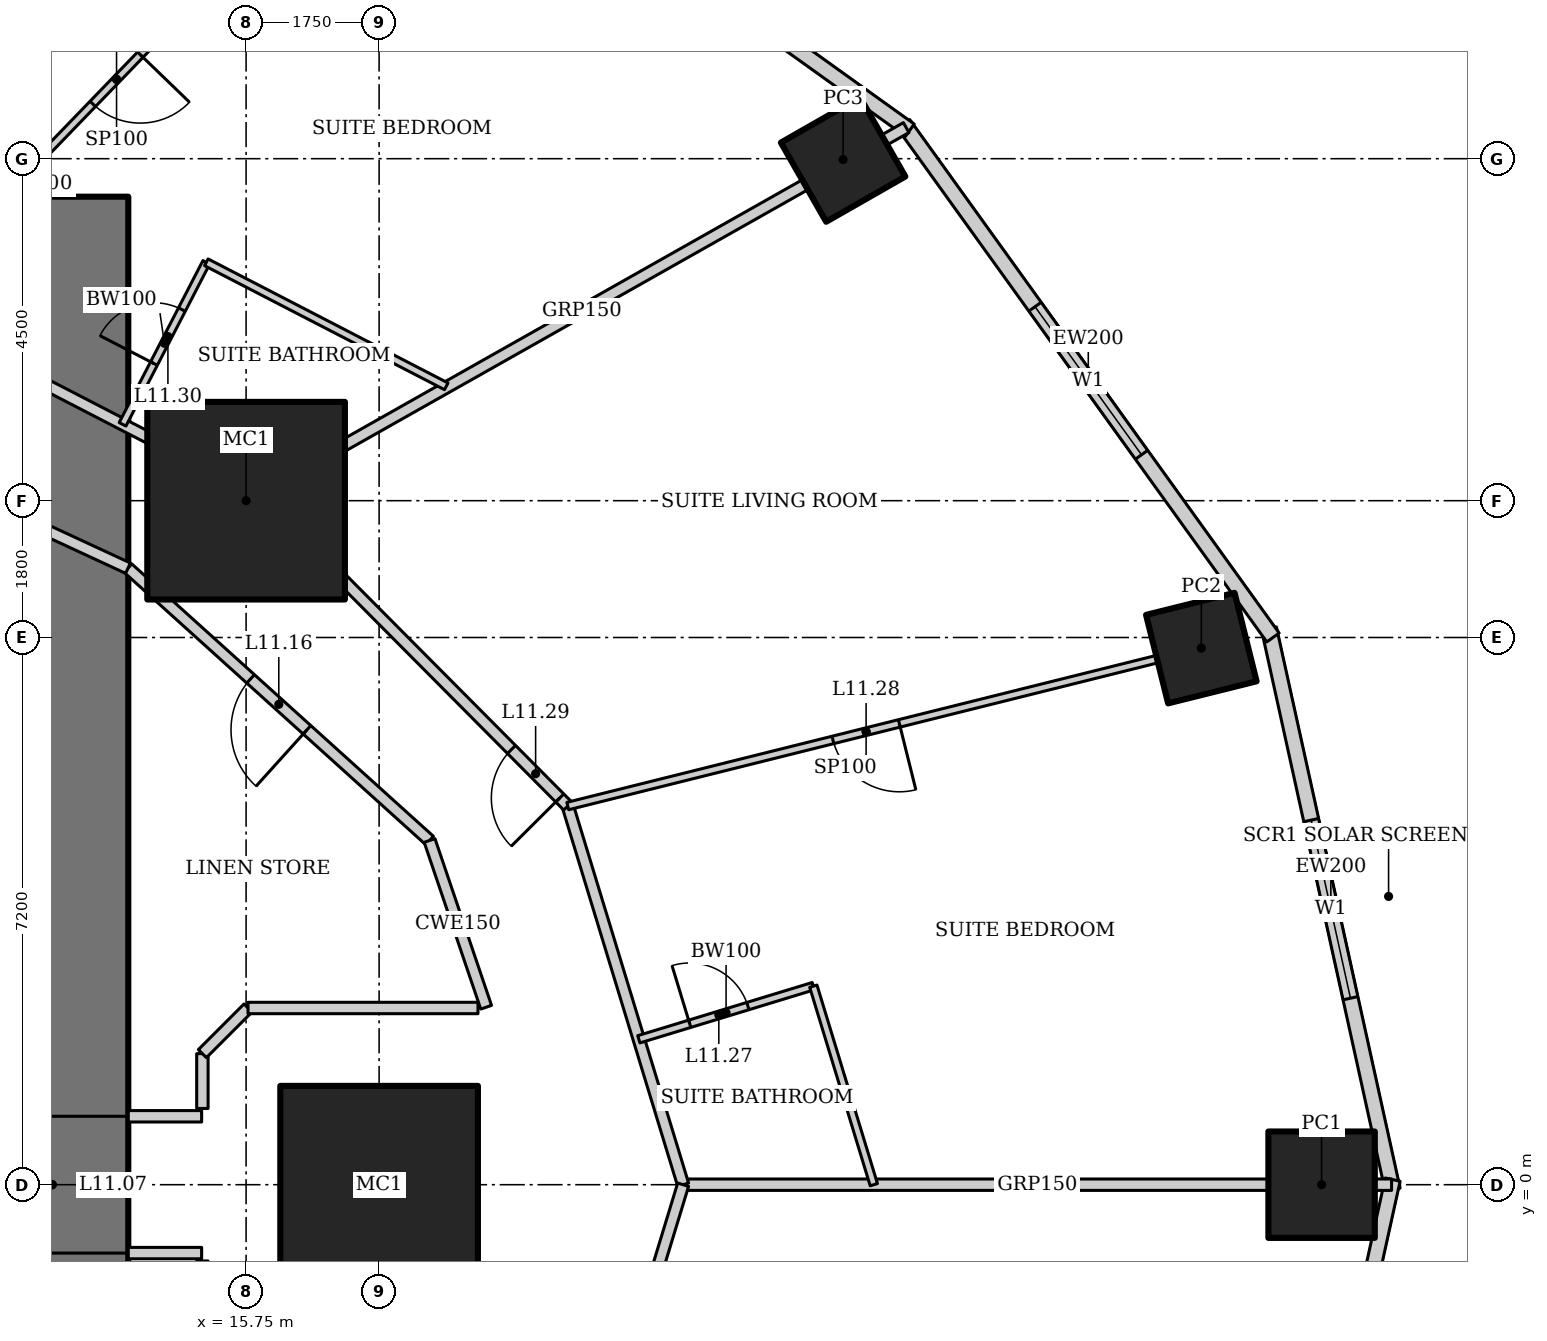
"""IFC4 building model, lengths in metres.
Left out: names, types, materials, properties, quantities, classifications, styles, units other than length and angle.
Written with IfcOpenShell. Run it as: python <this file> out.ifc"""

import sys

from ifc_helpers import new_model, si_unit, direction, frame, frame_2d, origin, origin_2d, place, context, subcontext, project, spatial, rectangle, hollow_rectangle, extrude, element, fill, save


model = new_model("IFC4")
c1 = context("Model", 3, precision=1e-05, world=origin(), true_north=direction((0.0, 1.0)))
c2 = subcontext(c1, "Body", "Model", "MODEL_VIEW")
j1 = project(units=[si_unit("LENGTHUNIT", "METRE"), si_unit("PLANEANGLEUNIT", "RADIAN")], contexts=[c1])
p1 = place(None, origin())
s1 = spatial("IfcSite", under=j1, at=p1, CompositionType="ELEMENT")
p2 = place(p1, origin())
s2 = spatial("IfcBuilding", under=s1, at=p2, CompositionType="ELEMENT")
p3 = place(p2, frame((0.0, 0.0, 55.0)))
s3 = spatial("IfcBuildingStorey", under=s2, at=p3, CompositionType="ELEMENT", Elevation=55.0)
for number, where, z_axis, x_axis in (
    (1, (17.5, 0.0, 0.0), (0.0, 0.0, 1.0), (1.0, 0.0, 0.0)),
    (2, (15.75, 9.0, 0.0), (0.0, 0.0, 1.0), (1.0, 0.0, 0.0)),
):
    element("IfcColumn", number, at=place(p3, frame(where, z_axis=z_axis, x_axis=x_axis)), inside=s3, PredefinedType="COLUMN", context=c2, shape_type="SweptSolid", body=[
        extrude(hollow_rectangle(XDim=2.6, YDim=2.6, WallThickness=0.13, at=origin_2d()), origin(), (0.0, 0.0, 1.0), 3.6),
    ])
p4 = place(p3, frame((29.9, 0.0, 0.0), z_axis=(0.0, 0.0, 1.0), x_axis=(1.0, 0.0, 0.0)))
e3 = element("IfcColumn", 3, at=p4, inside=s3, PredefinedType="COLUMN", context=c2, shape_type="SweptSolid", body=[
    extrude(hollow_rectangle(XDim=1.4, YDim=1.4, WallThickness=0.1, at=origin_2d()), origin(), (0.0, 0.0, 1.0), 3.6),
])
p5 = place(p3, frame((28.318, 7.06, 0.0), z_axis=(0.0, 0.0, 1.0), x_axis=(0.970295726276, 0.2419218956, 0.0)))
e4 = element("IfcColumn", 4, at=p5, inside=s3, PredefinedType="COLUMN", context=c2, shape_type="SweptSolid", body=[
    extrude(hollow_rectangle(XDim=1.2, YDim=1.2, WallThickness=0.1, at=origin_2d()), origin(), (0.0, 0.0, 1.0), 3.6),
])
p6 = place(p3, frame((23.605, 13.489, 0.0), z_axis=(0.0, 0.0, 1.0), x_axis=(0.86824298017, 0.496139221777, 0.0)))
e5 = element("IfcColumn", 5, at=p6, inside=s3, PredefinedType="COLUMN", context=c2, shape_type="SweptSolid", body=[
    extrude(hollow_rectangle(XDim=1.2, YDim=1.2, WallThickness=0.12, at=origin_2d()), origin(), (0.0, 0.0, 1.0), 3.6),
])
p7 = place(p3, frame((13.2, -13.0, 0.0), z_axis=(0.0, 0.0, 1.0), x_axis=(0.0, 1.0, 0.0)))
e6 = element("IfcWall", 6, at=p7, inside=s3, PredefinedType="SHEAR", context=c2, shape_type="SweptSolid", body=[
    extrude(rectangle(XDim=26.0, YDim=2.0, at=frame_2d((13.0, 0.0))), origin(), (0.0, 0.0, 1.0), 3.6),
])
p8 = place(p7, frame((12.1, 0.0, 0.0)))
e7 = element("IfcOpeningElement", 7, at=p8, cuts=e6, PredefinedType="OPENING", context=c2, shape_type="SweptSolid", body=[
    extrude(rectangle(XDim=1.8, YDim=2.1, at=frame_2d((0.9, 1.05))), frame((0.0, 1.01, 0.0), z_axis=(0.0, -1.0, 0.0), x_axis=(1.0, 0.0, 0.0)), (0.0, 0.0, 1.0), 2.02),
])
p9 = place(p3, frame((30.835, -0.067, 0.0), z_axis=(0.0, 0.0, 1.0), x_axis=(-0.215238065514, 0.976561608478, 0.0)))
e8 = element("IfcWall", 8, at=p9, inside=s3, PredefinedType="SOLIDWALL", context=c2, shape_type="SweptSolid", body=[
    extrude(rectangle(XDim=7.562, YDim=0.2, at=frame_2d((3.781, 0.0))), origin(), (0.0, 0.0, 1.0), 3.45),
])
p10 = place(p9, frame((2.581, 0.0, 0.5)))
e9 = element("IfcOpeningElement", 9, at=p10, cuts=e8, PredefinedType="OPENING", context=c2, shape_type="SweptSolid", body=[
    extrude(rectangle(XDim=2.4, YDim=2.2, at=frame_2d((1.2, 1.1))), frame((0.0, 0.11, 0.0), z_axis=(0.0, -1.0, 0.0), x_axis=(1.0, 0.0, 0.0)), (0.0, 0.0, 1.0), 0.22),
])
p11 = place(p3, frame((29.26, 7.2, 0.0), z_axis=(0.0, 0.0, 1.0), x_axis=(-0.583937613703, 0.811798536155, 0.0)))
e10 = element("IfcWall", 10, at=p11, inside=s3, PredefinedType="SOLIDWALL", context=c2, shape_type="SweptSolid", body=[
    extrude(rectangle(XDim=8.323, YDim=0.2, at=frame_2d((4.162, 0.0))), origin(), (0.0, 0.0, 1.0), 3.45),
])
p12 = place(p11, frame((2.961, 0.0, 0.5)))
e11 = element("IfcOpeningElement", 11, at=p12, cuts=e10, PredefinedType="OPENING", context=c2, shape_type="SweptSolid", body=[
    extrude(rectangle(XDim=2.4, YDim=2.2, at=frame_2d((1.2, 1.1))), frame((0.0, 0.11, 0.0), z_axis=(0.0, -1.0, 0.0), x_axis=(1.0, 0.0, 0.0)), (0.0, 0.0, 1.0), 0.22),
])
p13 = place(p3, frame((24.482, 13.875, 0.0), z_axis=(0.0, 0.0, 1.0), x_axis=(-0.812791321576, 0.582554948112, 0.0)))
e12 = element("IfcWall", 12, at=p13, inside=s3, PredefinedType="SOLIDWALL", context=c2, shape_type="SweptSolid", body=[
    extrude(rectangle(XDim=8.063, YDim=0.2, at=frame_2d((4.032, 0.0))), origin(), (0.0, 0.0, 1.0), 3.45),
])
p14 = place(p13, frame((2.832, 0.0, 0.5)))
e13 = element("IfcOpeningElement", 13, at=p14, cuts=e12, PredefinedType="OPENING", context=c2, shape_type="SweptSolid", body=[
    extrude(rectangle(XDim=2.4, YDim=2.2, at=frame_2d((1.2, 1.1))), frame((0.0, 0.11, 0.0), z_axis=(0.0, -1.0, 0.0), x_axis=(1.0, 0.0, 0.0)), (0.0, 0.0, 1.0), 0.22),
])
p15 = place(p3, frame((29.208, -7.318, 0.0), z_axis=(0.0, 0.0, 1.0), x_axis=(0.215238065514, 0.976561608478, 0.0)))
e14 = element("IfcWall", 14, at=p15, inside=s3, PredefinedType="SOLIDWALL", context=c2, shape_type="SweptSolid", body=[
    extrude(rectangle(XDim=7.562, YDim=0.2, at=frame_2d((3.781, 0.0))), origin(), (0.0, 0.0, 1.0), 3.45),
])
p16 = place(p15, frame((2.581, 0.0, 0.5)))
e15 = element("IfcOpeningElement", 15, at=p16, cuts=e14, PredefinedType="OPENING", context=c2, shape_type="SweptSolid", body=[
    extrude(rectangle(XDim=2.4, YDim=2.2, at=frame_2d((1.2, 1.1))), frame((0.0, 0.11, 0.0), z_axis=(0.0, -1.0, 0.0), x_axis=(1.0, 0.0, 0.0)), (0.0, 0.0, 1.0), 0.22),
])
p17 = place(p3, frame((30.821, 0.0, 0.0), z_axis=(0.0, 0.0, 1.0), x_axis=(-1.0, 0.0, 0.0)))
e16 = element("IfcWall", 16, at=p17, inside=s3, PredefinedType="PARTITIONING", context=c2, shape_type="SweptSolid", body=[
    extrude(rectangle(XDim=9.321, YDim=0.15, at=frame_2d((4.66, 0.0))), origin(), (0.0, 0.0, 1.0), 2.528),
])
p18 = place(p3, frame((24.435, 13.909, 0.0), z_axis=(0.0, 0.0, 1.0), x_axis=(-0.870612006791, -0.491970256856, 0.0)))
e17 = element("IfcWall", 17, at=p18, inside=s3, PredefinedType="PARTITIONING", context=c2, shape_type="SweptSolid", body=[
    extrude(rectangle(XDim=9.802, YDim=0.15, at=frame_2d((4.901, 0.0))), origin(), (0.0, 0.0, 1.0), 2.693),
])
p19 = place(p3, frame((21.5, 0.0, 0.0), z_axis=(0.0, 0.0, 1.0), x_axis=(-0.291383581394, 0.95660629754, 0.0)))
e18 = element("IfcWall", 18, at=p19, inside=s3, PredefinedType="PARTITIONING", context=c2, shape_type="SweptSolid", body=[
    extrude(rectangle(XDim=5.208, YDim=0.15, at=frame_2d((2.604, 0.0))), origin(), (0.0, 0.0, 1.0), 3.45),
])
p20 = place(p3, frame((19.982, 4.982, 0.0), z_axis=(0.0, 0.0, 1.0), x_axis=(-0.705121546414, 0.709086457904, 0.0)))
e19 = element("IfcWall", 19, at=p20, inside=s3, PredefinedType="PARTITIONING", context=c2, shape_type="SweptSolid", body=[
    extrude(rectangle(XDim=5.788, YDim=0.15, at=frame_2d((2.894, 0.0))), origin(), (0.0, 0.0, 1.0), 3.45),
])
p21 = place(p20, frame((0.15, 0.0, 0.0)))
e20 = element("IfcOpeningElement", 20, at=p21, cuts=e19, PredefinedType="OPENING", context=c2, shape_type="SweptSolid", body=[
    extrude(rectangle(XDim=0.9, YDim=2.1, at=frame_2d((0.45, 1.05))), frame((0.0, 0.085, 0.0), z_axis=(0.0, -1.0, 0.0), x_axis=(1.0, 0.0, 0.0)), (0.0, 0.0, 1.0), 0.17),
])
p22 = place(p3, frame((15.901, 9.086, 0.0), z_axis=(0.0, 0.0, 1.0), x_axis=(-0.888333171507, 0.459199495209, 0.0)))
e21 = element("IfcWall", 21, at=p22, inside=s3, PredefinedType="PARTITIONING", context=c2, shape_type="SweptSolid", body=[
    extrude(rectangle(XDim=5.351, YDim=0.15, at=frame_2d((2.676, 0.0))), origin(), (0.0, 0.0, 1.0), 3.45),
])
p23 = place(p3, frame((19.982, -4.982, 0.0), z_axis=(0.0, 0.0, 1.0), x_axis=(0.291383581394, 0.95660629754, 0.0)))
e22 = element("IfcWall", 22, at=p23, inside=s3, PredefinedType="PARTITIONING", context=c2, shape_type="SweptSolid", body=[
    extrude(rectangle(XDim=5.208, YDim=0.15, at=frame_2d((2.604, 0.0))), origin(), (0.0, 0.0, 1.0), 3.45),
])
p24 = place(p23, frame((0.15, 0.0, 0.0)))
e23 = element("IfcOpeningElement", 23, at=p24, cuts=e22, PredefinedType="OPENING", context=c2, shape_type="SweptSolid", body=[
    extrude(rectangle(XDim=0.9, YDim=2.1, at=frame_2d((0.45, 1.05))), frame((0.0, 0.085, 0.0), z_axis=(0.0, -1.0, 0.0), x_axis=(1.0, 0.0, 0.0)), (0.0, 0.0, 1.0), 0.17),
])
p25 = place(p3, frame((18.164, 4.529, 0.0), z_axis=(0.0, 0.0, 1.0), x_axis=(-0.742194222, 0.670184852731, 0.0)))
e24 = element("IfcWall", 24, at=p25, inside=s3, PredefinedType="PARTITIONING", context=c2, shape_type="SweptSolid", body=[
    extrude(rectangle(XDim=5.347, YDim=0.15, at=frame_2d((2.673, 0.0))), origin(), (0.0, 0.0, 1.0), 3.45),
])
p26 = place(p25, frame((2.173, 0.0, 0.0)))
e25 = element("IfcOpeningElement", 25, at=p26, cuts=e24, PredefinedType="OPENING", context=c2, shape_type="SweptSolid", body=[
    extrude(rectangle(XDim=1.0, YDim=2.1, at=frame_2d((0.5, 1.05))), frame((0.0, 0.085, 0.0), z_axis=(0.0, -1.0, 0.0), x_axis=(1.0, 0.0, 0.0)), (0.0, 0.0, 1.0), 0.17),
])
p27 = place(p3, frame((14.196, 8.112, 0.0), z_axis=(0.0, 0.0, 1.0), x_axis=(-0.907279653965, 0.420527798727, 0.0)))
e26 = element("IfcWall", 26, at=p27, inside=s3, PredefinedType="PARTITIONING", context=c2, shape_type="SweptSolid", body=[
    extrude(rectangle(XDim=4.844, YDim=0.15, at=frame_2d((2.422, 0.0))), origin(), (0.0, 0.0, 1.0), 3.45),
])
p28 = place(p3, frame((20.917, 1.913, 0.0), z_axis=(0.0, 0.0, 1.0), x_axis=(0.956591303063, 0.291432803411, 0.0)))
e27 = element("IfcWall", 27, at=p28, inside=s3, PredefinedType="PARTITIONING", context=c2, shape_type="SweptSolid", body=[
    extrude(rectangle(XDim=2.4, YDim=0.1, at=frame_2d((1.2, 0.0))), origin(), (0.0, 0.0, 1.0), 3.45),
])
p29 = place(p28, frame((0.7, 0.0, 0.0)))
e28 = element("IfcOpeningElement", 28, at=p29, cuts=e27, PredefinedType="OPENING", context=c2, shape_type="SweptSolid", body=[
    extrude(rectangle(XDim=0.8, YDim=2.1, at=frame_2d((0.4, 1.05))), frame((0.0, 0.06, 0.0), z_axis=(0.0, -1.0, 0.0), x_axis=(1.0, 0.0, 0.0)), (0.0, 0.0, 1.0), 0.12),
])
p30 = place(p3, frame((23.213, 2.613, 0.0), z_axis=(0.0, 0.0, 1.0), x_axis=(0.291339473488, -0.956619731757, 0.0)))
e29 = element("IfcWall", 29, at=p30, inside=s3, PredefinedType="PARTITIONING", context=c2, shape_type="SweptSolid", body=[
    extrude(rectangle(XDim=2.731, YDim=0.1, at=frame_2d((1.365, 0.0))), origin(), (0.0, 0.0, 1.0), 3.45),
])
p31 = place(p3, frame((27.833, 6.939, 0.0), z_axis=(0.0, 0.0, 1.0), x_axis=(-0.97029673161, -0.24191786339, 0.0)))
e30 = element("IfcWall", 30, at=p31, inside=s3, PredefinedType="PARTITIONING", context=c2, shape_type="SweptSolid", body=[
    extrude(rectangle(XDim=8.091, YDim=0.1, at=frame_2d((4.045, 0.0))), origin(), (0.0, 0.0, 1.0), 2.333),
])
p32 = place(p31, frame((3.595, 0.0, 0.0)))
e31 = element("IfcOpeningElement", 31, at=p32, cuts=e30, PredefinedType="OPENING", context=c2, shape_type="SweptSolid", body=[
    extrude(rectangle(XDim=0.9, YDim=2.1, at=frame_2d((0.45, 1.05))), frame((0.0, 0.06, 0.0), z_axis=(0.0, -1.0, 0.0), x_axis=(1.0, 0.0, 0.0)), (0.0, 0.0, 1.0), 0.12),
])
p33 = place(p3, frame((14.125, 10.005, 0.0), z_axis=(0.0, 0.0, 1.0), x_axis=(0.459218106657, 0.888323550582, 0.0)))
e32 = element("IfcWall", 32, at=p33, inside=s3, PredefinedType="PARTITIONING", context=c2, shape_type="SweptSolid", body=[
    extrude(rectangle(XDim=2.4, YDim=0.1, at=frame_2d((1.2, 0.0))), origin(), (0.0, 0.0, 1.0), 3.45),
])
p34 = place(p33, frame((0.9, 0.0, 0.0)))
e33 = element("IfcOpeningElement", 33, at=p34, cuts=e32, PredefinedType="OPENING", context=c2, shape_type="SweptSolid", body=[
    extrude(rectangle(XDim=0.8, YDim=2.1, at=frame_2d((0.4, 1.05))), frame((0.0, 0.06, 0.0), z_axis=(0.0, -1.0, 0.0), x_axis=(1.0, 0.0, 0.0)), (0.0, 0.0, 1.0), 0.12),
])
p35 = place(p3, frame((15.227, 12.137, 0.0), z_axis=(0.0, 0.0, 1.0), x_axis=(0.888342312029, -0.459181812204, 0.0)))
e34 = element("IfcWall", 34, at=p35, inside=s3, PredefinedType="PARTITIONING", context=c2, shape_type="SweptSolid", body=[
    extrude(rectangle(XDim=3.554, YDim=0.1, at=frame_2d((1.777, 0.0))), origin(), (0.0, 0.0, 1.0), 3.45),
])
p36 = place(p3, frame((16.944, 17.545, 0.0), z_axis=(0.0, 0.0, 1.0), x_axis=(-0.694680670522, -0.71931826475, 0.0)))
e35 = element("IfcWall", 35, at=p36, inside=s3, PredefinedType="PARTITIONING", context=c2, shape_type="SweptSolid", body=[
    extrude(rectangle(XDim=8.344, YDim=0.1, at=frame_2d((4.172, 0.0))), origin(), (0.0, 0.0, 1.0), 2.528),
])
p37 = place(p36, frame((3.722, 0.0, 0.0)))
e36 = element("IfcOpeningElement", 36, at=p37, cuts=e35, PredefinedType="OPENING", context=c2, shape_type="SweptSolid", body=[
    extrude(rectangle(XDim=0.9, YDim=2.1, at=frame_2d((0.45, 1.05))), frame((0.0, 0.06, 0.0), z_axis=(0.0, -1.0, 0.0), x_axis=(1.0, 0.0, 0.0)), (0.0, 0.0, 1.0), 0.12),
])
p38 = place(p3, frame((13.2, 13.0, 0.0), z_axis=(0.0, 0.0, 1.0), x_axis=(-0.719347134512, 0.69465077562, 0.0)))
e37 = element("IfcWall", 37, at=p38, inside=s3, PredefinedType="PARTITIONING", context=c2, shape_type="SweptSolid", body=[
    extrude(rectangle(XDim=0.465, YDim=0.1, at=frame_2d((0.232, 0.0))), origin(), (0.0, 0.0, 1.0), 3.45),
])
p39 = place(p3, frame((18.908, 2.335, 0.0), z_axis=(0.0, 0.0, 1.0), x_axis=(-0.321124194945, 0.947037090837, 0.0)))
e38 = element("IfcWall", 38, at=p39, inside=s3, PredefinedType="PARTITIONING", context=c2, shape_type="SweptSolid", body=[
    extrude(rectangle(XDim=2.317, YDim=0.15, at=frame_2d((1.158, 0.0))), origin(), (0.0, 0.0, 1.0), 3.45),
])
for number, where, z_axis, x_axis in (
    (39, (14.2, -0.9, 0.0), (0.0, 0.0, 1.0), (1.0, 0.0, 0.0)),
    (40, (14.2, 0.9, 0.0), (0.0, 0.0, 1.0), (1.0, 0.0, 0.0)),
):
    element("IfcWall", number, at=place(p3, frame(where, z_axis=z_axis, x_axis=x_axis)), inside=s3, PredefinedType="PARTITIONING", context=c2, shape_type="SweptSolid", body=[
        extrude(rectangle(XDim=0.965, YDim=0.15, at=frame_2d((0.482, 0.0))), origin(), (0.0, 0.0, 1.0), 3.45),
    ])
p40 = place(p3, frame((15.175, 1.003, 0.0), z_axis=(0.0, 0.0, 1.0), x_axis=(0.0, 1.0, 0.0)))
e41 = element("IfcWall", 41, at=p40, inside=s3, PredefinedType="PARTITIONING", context=c2, shape_type="SweptSolid", body=[
    extrude(rectangle(XDim=0.721, YDim=0.15, at=frame_2d((0.361, 0.0))), origin(), (0.0, 0.0, 1.0), 3.45),
])
p41 = place(p3, frame((15.175, 1.725, 0.0), z_axis=(0.0, 0.0, 1.0), x_axis=(0.707106781187, 0.707106781187, 0.0)))
e42 = element("IfcWall", 42, at=p41, inside=s3, PredefinedType="PARTITIONING", context=c2, shape_type="SweptSolid", body=[
    extrude(rectangle(XDim=0.849, YDim=0.15, at=frame_2d((0.425, 0.0))), origin(), (0.0, 0.0, 1.0), 3.45),
])
p42 = place(p3, frame((15.775, 2.325, 0.0), z_axis=(0.0, 0.0, 1.0), x_axis=(1.0, 0.0, 0.0)))
e43 = element("IfcWall", 43, at=p42, inside=s3, PredefinedType="PARTITIONING", context=c2, shape_type="SweptSolid", body=[
    extrude(rectangle(XDim=3.025, YDim=0.15, at=frame_2d((1.513, 0.0))), origin(), (0.0, 0.0, 1.0), 3.45),
])
p43 = place(p10, origin())
e44 = element("IfcWindow", 44, at=p43, inside=s3, PartitioningType="SINGLE_PANEL", PredefinedType="WINDOW", context=c2, shape_type="SweptSolid", body=[
    extrude(rectangle(XDim=2.4, YDim=2.2, at=frame_2d((1.2, 1.1))), frame((0.0, 0.03, 0.0), z_axis=(0.0, -1.0, 0.0), x_axis=(1.0, 0.0, 0.0)), (0.0, 0.0, 1.0), 0.06),
])
fill(e9, e44)
p44 = place(p12, origin())
e45 = element("IfcWindow", 45, at=p44, inside=s3, PartitioningType="SINGLE_PANEL", PredefinedType="WINDOW", context=c2, shape_type="SweptSolid", body=[
    extrude(rectangle(XDim=2.4, YDim=2.2, at=frame_2d((1.2, 1.1))), frame((0.0, 0.03, 0.0), z_axis=(0.0, -1.0, 0.0), x_axis=(1.0, 0.0, 0.0)), (0.0, 0.0, 1.0), 0.06),
])
fill(e11, e45)
p45 = place(p8, origin())
e46 = element("IfcDoor", 46, at=p45, inside=s3, OperationType="DOUBLE_DOOR_DOUBLE_SWING", PredefinedType="DOOR", context=c2, shape_type="SweptSolid", body=[
    extrude(rectangle(XDim=1.8, YDim=2.1, at=frame_2d((0.9, 1.05))), frame((0.0, 0.025, 0.0), z_axis=(0.0, -1.0, 0.0), x_axis=(1.0, 0.0, 0.0)), (0.0, 0.0, 1.0), 0.05),
])
fill(e7, e46)
p46 = place(p26, origin())
e47 = element("IfcDoor", 47, at=p46, inside=s3, OperationType="SINGLE_SWING_LEFT", PredefinedType="DOOR", context=c2, shape_type="SweptSolid", body=[
    extrude(rectangle(XDim=1.0, YDim=2.1, at=frame_2d((0.5, 1.05))), frame((0.0, 0.025, 0.0), z_axis=(0.0, -1.0, 0.0), x_axis=(1.0, 0.0, 0.0)), (0.0, 0.0, 1.0), 0.05),
])
fill(e25, e47)
p47 = place(p29, origin())
e48 = element("IfcDoor", 48, at=p47, inside=s3, OperationType="SINGLE_SWING_LEFT", PredefinedType="DOOR", context=c2, shape_type="SweptSolid", body=[
    extrude(rectangle(XDim=0.8, YDim=2.1, at=frame_2d((0.4, 1.05))), frame((0.0, 0.025, 0.0), z_axis=(0.0, -1.0, 0.0), x_axis=(1.0, 0.0, 0.0)), (0.0, 0.0, 1.0), 0.05),
])
fill(e28, e48)
p48 = place(p32, origin())
e49 = element("IfcDoor", 49, at=p48, inside=s3, OperationType="SINGLE_SWING_LEFT", PredefinedType="DOOR", context=c2, shape_type="SweptSolid", body=[
    extrude(rectangle(XDim=0.9, YDim=2.1, at=frame_2d((0.45, 1.05))), frame((0.0, 0.025, 0.0), z_axis=(0.0, -1.0, 0.0), x_axis=(1.0, 0.0, 0.0)), (0.0, 0.0, 1.0), 0.05),
])
fill(e31, e49)
p49 = place(p21, origin())
e50 = element("IfcDoor", 50, at=p49, inside=s3, OperationType="SINGLE_SWING_LEFT", PredefinedType="DOOR", context=c2, shape_type="SweptSolid", body=[
    extrude(rectangle(XDim=0.9, YDim=2.1, at=frame_2d((0.45, 1.05))), frame((0.0, 0.025, 0.0), z_axis=(0.0, -1.0, 0.0), x_axis=(1.0, 0.0, 0.0)), (0.0, 0.0, 1.0), 0.05),
])
fill(e20, e50)
p50 = place(p34, origin())
e51 = element("IfcDoor", 51, at=p50, inside=s3, OperationType="SINGLE_SWING_LEFT", PredefinedType="DOOR", context=c2, shape_type="SweptSolid", body=[
    extrude(rectangle(XDim=0.8, YDim=2.1, at=frame_2d((0.4, 1.05))), frame((0.0, 0.025, 0.0), z_axis=(0.0, -1.0, 0.0), x_axis=(1.0, 0.0, 0.0)), (0.0, 0.0, 1.0), 0.05),
])
fill(e33, e51)
p51 = place(p37, origin())
e52 = element("IfcDoor", 52, at=p51, inside=s3, OperationType="SINGLE_SWING_LEFT", PredefinedType="DOOR", context=c2, shape_type="SweptSolid", body=[
    extrude(rectangle(XDim=0.9, YDim=2.1, at=frame_2d((0.45, 1.05))), frame((0.0, 0.025, 0.0), z_axis=(0.0, -1.0, 0.0), x_axis=(1.0, 0.0, 0.0)), (0.0, 0.0, 1.0), 0.05),
])
fill(e36, e52)
save(model, sys.argv[1])
